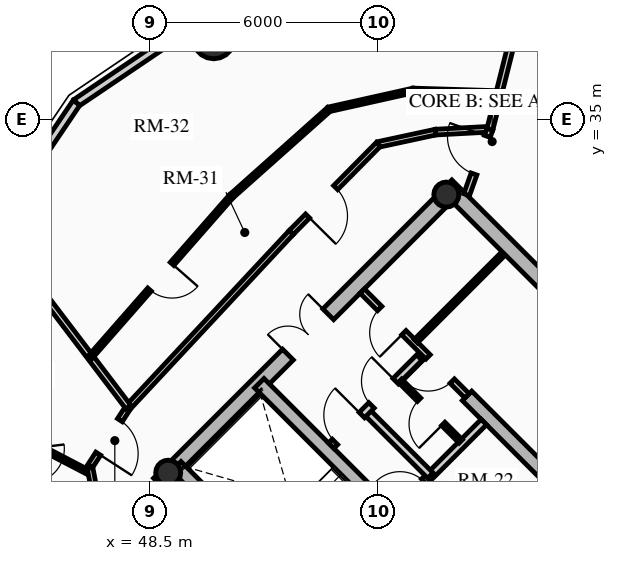
"""IFC4 building model, lengths in metres.
Left out: names, types, materials, properties, quantities, classifications, styles, units other than length and angle.
Written with IfcOpenShell. Run it as: python <this file> out.ifc"""

import sys

from ifc_helpers import new_model, si_unit, direction, frame, frame_2d, origin, origin_2d, place, context, subcontext, project, spatial, rectangle, circle, hollow_circle, extrude, source, transform, mapped, element, fill, save


model = new_model("IFC4")
c1 = context("Model", 3, precision=1e-05, world=origin(), true_north=direction((0.0, 1.0)))
c2 = subcontext(c1, "Body", "Model", "MODEL_VIEW")
j1 = project(units=[si_unit("LENGTHUNIT", "METRE"), si_unit("PLANEANGLEUNIT", "RADIAN")], contexts=[c1])
p1 = place(None, origin())
s1 = spatial("IfcSite", under=j1, at=p1, CompositionType="ELEMENT")
p2 = place(p1, origin())
s2 = spatial("IfcBuilding", under=s1, at=p2, CompositionType="ELEMENT")
p3 = place(p2, frame((0.0, 0.0, 219.94)))
s3 = spatial("IfcBuildingStorey", under=s2, at=p3, CompositionType="ELEMENT", Elevation=219.94)
for number, where, z_axis, x_axis in (
    (1, (58.702, 15.732, 0.0), (0.0, 0.0, 1.0), (-0.707, 0.707, 0.0)),
    (2, (66.268, 23.298, 0.0), (0.0, 0.0, 1.0), (-0.707, 0.707, 0.0)),
):
    element("IfcWall", number, at=place(p3, frame(where, z_axis=z_axis, x_axis=x_axis)), inside=s3, PredefinedType="SHEAR", context=c2, shape_type="SweptSolid", body=[
        extrude(rectangle(XDim=14.1, YDim=0.4, at=frame_2d((7.05, 0.0))), origin(), (0.0, 0.0, 1.0), 2.91),
    ])
p4 = place(p3, frame((48.873, 25.561, 0.0), z_axis=(0.0, 0.0, 1.0), x_axis=(0.707106781187, 0.707106781187, 0.0)))
e3 = element("IfcWall", 3, at=p4, inside=s3, PredefinedType="SHEAR", context=c2, shape_type="SweptSolid", body=[
    extrude(rectangle(XDim=10.7, YDim=0.4, at=frame_2d((5.35, 0.0))), origin(), (0.0, 0.0, 1.0), 2.91),
])
m1 = source(origin(), c2, "Body", "SweptSolid", [
    extrude(rectangle(XDim=1.5, YDim=2.02, at=frame_2d((0.75, 1.01))), frame((0.0, 0.21, 0.0), z_axis=(0.0, -1.0, 0.0), x_axis=(1.0, 0.0, 0.0)), (0.0, 0.0, 1.0), 0.42),
])
p5 = place(p4, frame((4.6, 0.0, 0.0)))
e4 = element("IfcOpeningElement", 4, at=p5, cuts=e3, PredefinedType="OPENING", context=c2, shape_type="MappedRepresentation", body=[
    mapped(m1, transform((0.0, 0.0, 0.0), x_axis=(1.0, 0.0, 0.0), y_axis=(0.0, 1.0, 0.0), z_axis=(0.0, 0.0, 1.0), scale=1.0)),
])
p6 = place(p3, frame((61.06, 18.373, 0.0), z_axis=(0.0, 0.0, 1.0), x_axis=(-0.707106781187, 0.707106781187, 0.0)))
e5 = element("IfcWall", 5, at=p6, inside=s3, PredefinedType="SHEAR", context=c2, shape_type="SweptSolid", body=[
    extrude(rectangle(XDim=13.7, YDim=0.35, at=frame_2d((6.85, 0.0))), origin(), (0.0, 0.0, 1.0), 2.91),
])
m2 = source(origin(), c2, "Body", "SweptSolid", [
    extrude(rectangle(XDim=1.1, YDim=2.015, at=frame_2d((0.55, 1.007))), frame((0.0, 0.185, 0.0), z_axis=(0.0, -1.0, 0.0), x_axis=(1.0, 0.0, 0.0)), (0.0, 0.0, 1.0), 0.37),
])
p7 = place(p6, frame((4.85, 0.0, 0.0)))
e6 = element("IfcOpeningElement", 6, at=p7, cuts=e5, PredefinedType="OPENING", context=c2, shape_type="MappedRepresentation", body=[
    mapped(m2, transform((0.0, 0.0, 0.0), x_axis=(1.0, 0.0, 0.0), y_axis=(0.0, 1.0, 0.0), z_axis=(0.0, 0.0, 1.0), scale=1.0)),
])
p8 = place(p6, frame((0.625, 0.0, 0.0)))
e7 = element("IfcOpeningElement", 7, at=p8, cuts=e5, PredefinedType="OPENING", context=c2, shape_type="MappedRepresentation", body=[
    mapped(m2, transform((0.0, 0.0, 0.0), x_axis=(1.0, 0.0, 0.0), y_axis=(0.0, 1.0, 0.0), z_axis=(0.0, 0.0, 1.0), scale=1.0)),
])
p9 = place(p6, frame((2.625, 0.0, 0.0)))
e8 = element("IfcOpeningElement", 8, at=p9, cuts=e5, PredefinedType="OPENING", context=c2, shape_type="MappedRepresentation", body=[
    mapped(m2, transform((0.0, 0.0, 0.0), x_axis=(1.0, 0.0, 0.0), y_axis=(0.0, 1.0, 0.0), z_axis=(0.0, 0.0, 1.0), scale=1.0)),
])
m3 = source(origin(), c2, "Body", "SweptSolid", [
    extrude(rectangle(XDim=1.15, YDim=2.02, at=frame_2d((0.575, 1.01))), frame((0.0, 0.185, 0.0), z_axis=(0.0, -1.0, 0.0), x_axis=(1.0, 0.0, 0.0)), (0.0, 0.0, 1.0), 0.37),
])
p10 = place(p6, frame((7.27, 0.0, 0.0)))
e9 = element("IfcOpeningElement", 9, at=p10, cuts=e5, PredefinedType="OPENING", context=c2, shape_type="MappedRepresentation", body=[
    mapped(m3, transform((0.0, 0.0, 0.0), x_axis=(1.0, 0.0, 0.0), y_axis=(0.0, 1.0, 0.0), z_axis=(0.0, 0.0, 1.0), scale=1.0)),
])
p11 = place(p3, frame((63.627, 20.94, 0.0), z_axis=(0.0, 0.0, 1.0), x_axis=(-0.707119496762, 0.707094065383, 0.0)))
e10 = element("IfcWall", 10, at=p11, inside=s3, PredefinedType="SHEAR", context=c2, shape_type="SweptSolid", body=[
    extrude(rectangle(XDim=9.6, YDim=0.35, at=frame_2d((4.8, 0.0))), origin(), (0.0, 0.0, 1.0), 2.91),
])
p12 = place(p11, frame((5.28, 0.0, 0.0)))
e11 = element("IfcOpeningElement", 11, at=p12, cuts=e10, PredefinedType="OPENING", context=c2, shape_type="MappedRepresentation", body=[
    mapped(m3, transform((0.0, 0.0, 0.0), x_axis=(1.0, 0.0, 0.0), y_axis=(0.0, 1.0, 0.0), z_axis=(0.0, 0.0, 1.0), scale=1.0)),
])
p13 = place(p3, frame((53.922, 21.141, 0.0), z_axis=(0.0, 0.0, 1.0), x_axis=(-0.707106781187, 0.707106781187, 0.0)))
e12 = element("IfcWall", 12, at=p13, inside=s3, PredefinedType="SHEAR", context=c2, shape_type="SweptSolid", body=[
    extrude(rectangle(XDim=6.695, YDim=0.35, at=frame_2d((3.348, 0.0))), origin(), (0.0, 0.0, 1.0), 2.91),
])
for number, where, z_axis, x_axis in (
    (13, (48.976, 25.706, 0.0), (0.0, 0.0, 1.0), (0.707, 0.707, 0.0)),
    (14, (56.294, 33.024, 0.0), (0.0, 0.0, 1.0), (0.707, 0.707, 0.0)),
):
    element("IfcColumn", number, at=place(p3, frame(where, z_axis=z_axis, x_axis=x_axis)), inside=s3, PredefinedType="COLUMN", context=c2, shape_type="SweptSolid", body=[
        extrude(hollow_circle(Radius=0.33, WallThickness=0.025, at=origin_2d()), origin(), (0.0, 0.0, 1.0), 2.91),
    ])
p14 = place(p3, frame((50.173, 37.146, 0.0), z_axis=(0.0, 0.0, 1.0), x_axis=(1.0, 0.0, 0.0)))
e15 = element("IfcColumn", 15, at=p14, inside=s3, PredefinedType="USERDEFINED", context=c2, shape_type="SweptSolid", body=[
    extrude(circle(Radius=0.55, at=origin_2d()), origin(), (0.0, 0.0, 1.0), 2.91),
])
p15 = place(p3, frame((46.561, 35.439, 0.0), z_axis=(0.0, 0.0, 1.0), x_axis=(0.828833723692, 0.559495003079, 0.0)))
e16 = element("IfcWall", 16, at=p15, inside=s3, PredefinedType="SOLIDWALL", context=c2, shape_type="SweptSolid", body=[
    extrude(rectangle(XDim=3.976, YDim=0.22, at=frame_2d((1.988, 0.0))), origin(), (0.0, 0.0, 1.0), 2.322),
])
p16 = place(p3, frame((44.337, 32.144, 0.0), z_axis=(0.0, 0.0, 1.0), x_axis=(0.559495003079, 0.828833723692, 0.0)))
e17 = element("IfcWall", 17, at=p16, inside=s3, PredefinedType="SOLIDWALL", context=c2, shape_type="SweptSolid", body=[
    extrude(rectangle(XDim=3.976, YDim=0.22, at=frame_2d((1.988, 0.0))), origin(), (0.0, 0.0, 1.0), 2.322),
])
m4 = source(origin(), c2, "Body", "SweptSolid", [
    extrude(rectangle(XDim=1.05, YDim=1.3, at=frame_2d((0.525, 0.65))), frame((0.0, 0.12, 0.0), z_axis=(0.0, -1.0, 0.0), x_axis=(1.0, 0.0, 0.0)), (0.0, 0.0, 1.0), 0.24),
])
p17 = place(p16, frame((1.463, 0.0, 0.65)))
e18 = element("IfcOpeningElement", 18, at=p17, cuts=e17, PredefinedType="OPENING", context=c2, shape_type="MappedRepresentation", body=[
    mapped(m4, transform((0.0, 0.0, 0.0), x_axis=(1.0, 0.0, 0.0), y_axis=(0.0, 1.0, 0.0), z_axis=(0.0, 0.0, 1.0), scale=1.0)),
])
p18 = place(p3, frame((54.961, 24.719, 0.0), z_axis=(0.0, 0.0, 1.0), x_axis=(0.707106781187, 0.707106781187, 0.0)))
e19 = element("IfcWall", 19, at=p18, inside=s3, PredefinedType="PARTITIONING", context=c2, shape_type="SweptSolid", body=[
    extrude(rectangle(XDim=3.28, YDim=0.2, at=frame_2d((1.64, 0.0))), origin(), (0.0, 0.0, 1.0), 2.685),
])
m5 = source(origin(), c2, "Body", "SweptSolid", [
    extrude(rectangle(XDim=0.9, YDim=2.005, at=frame_2d((0.45, 1.002))), frame((0.0, 0.11, 0.0), z_axis=(0.0, -1.0, 0.0), x_axis=(1.0, 0.0, 0.0)), (0.0, 0.0, 1.0), 0.22),
])
p19 = place(p18, frame((0.16, 0.0, 0.0)))
e20 = element("IfcOpeningElement", 20, at=p19, cuts=e19, PredefinedType="OPENING", context=c2, shape_type="MappedRepresentation", body=[
    mapped(m5, transform((0.0, 0.0, 0.0), x_axis=(1.0, 0.0, 0.0), y_axis=(0.0, 1.0, 0.0), z_axis=(0.0, 0.0, 1.0), scale=1.0)),
])
p20 = place(p3, frame((55.874, 25.631, 0.0), z_axis=(0.0, 0.0, 1.0), x_axis=(-0.707157639372, 0.707055919343, 0.0)))
e21 = element("IfcWall", 21, at=p20, inside=s3, PredefinedType="PARTITIONING", context=c2, shape_type="SweptSolid", body=[
    extrude(rectangle(XDim=2.4, YDim=0.2, at=frame_2d((1.2, 0.0))), origin(), (0.0, 0.0, 1.0), 2.685),
])
p21 = place(p3, frame((53.264, 26.416, 0.0), z_axis=(0.0, 0.0, 1.0), x_axis=(0.707106781187, 0.707106781187, 0.0)))
e22 = element("IfcWall", 22, at=p21, inside=s3, PredefinedType="PARTITIONING", context=c2, shape_type="SweptSolid", body=[
    extrude(rectangle(XDim=3.28, YDim=0.2, at=frame_2d((1.64, 0.0))), origin(), (0.0, 0.0, 1.0), 2.685),
])
m6 = source(origin(), c2, "Body", "SweptSolid", [
    extrude(rectangle(XDim=1.0, YDim=2.015, at=frame_2d((0.5, 1.007))), frame((0.0, 0.11, 0.0), z_axis=(0.0, -1.0, 0.0), x_axis=(1.0, 0.0, 0.0)), (0.0, 0.0, 1.0), 0.22),
])
p22 = place(p21, frame((0.14, 0.0, 0.0)))
e23 = element("IfcOpeningElement", 23, at=p22, cuts=e22, PredefinedType="OPENING", context=c2, shape_type="MappedRepresentation", body=[
    mapped(m6, transform((0.0, 0.0, 0.0), x_axis=(1.0, 0.0, 0.0), y_axis=(0.0, 1.0, 0.0), z_axis=(0.0, 0.0, 1.0), scale=1.0)),
])
p23 = place(p21, frame((1.5, 0.0, 0.0)))
e24 = element("IfcOpeningElement", 24, at=p23, cuts=e22, PredefinedType="OPENING", context=c2, shape_type="MappedRepresentation", body=[
    mapped(m5, transform((0.0, 0.0, 0.0), x_axis=(1.0, 0.0, 0.0), y_axis=(0.0, 1.0, 0.0), z_axis=(0.0, 0.0, 1.0), scale=1.0)),
])
p24 = place(p3, frame((56.673, 26.529, 0.0), z_axis=(0.0, 0.0, 1.0), x_axis=(-0.707052764397, 0.70716079385, 0.0)))
e25 = element("IfcWall", 25, at=p24, inside=s3, PredefinedType="PARTITIONING", context=c2, shape_type="SweptSolid", body=[
    extrude(rectangle(XDim=2.26, YDim=0.125, at=frame_2d((1.13, 0.0))), origin(), (0.0, 0.0, 1.0), 2.685),
])
m7 = source(origin(), c2, "Body", "SweptSolid", [
    extrude(rectangle(XDim=0.9, YDim=2.005, at=frame_2d((0.45, 1.002))), frame((0.0, 0.073, 0.0), z_axis=(0.0, -1.0, 0.0), x_axis=(1.0, 0.0, 0.0)), (0.0, 0.0, 1.0), 0.145),
])
p25 = place(p24, frame((0.65, 0.0, 0.0)))
e26 = element("IfcOpeningElement", 26, at=p25, cuts=e25, PredefinedType="OPENING", context=c2, shape_type="MappedRepresentation", body=[
    mapped(m7, transform((0.0, 0.0, 0.0), x_axis=(1.0, 0.0, 0.0), y_axis=(0.0, 1.0, 0.0), z_axis=(0.0, 0.0, 1.0), scale=1.0)),
])
p26 = place(p3, frame((56.839, 27.728, 0.0), z_axis=(0.0, 0.0, 1.0), x_axis=(-0.707106781187, 0.707106781187, 0.0)))
e27 = element("IfcWall", 27, at=p26, inside=s3, PredefinedType="PARTITIONING", context=c2, shape_type="SweptSolid", body=[
    extrude(rectangle(XDim=3.9, YDim=0.16, at=frame_2d((1.95, 0.0))), origin(), (0.0, 0.0, 1.0), 2.685),
])
m8 = source(origin(), c2, "Body", "SweptSolid", [
    extrude(rectangle(XDim=0.9, YDim=2.005, at=frame_2d((0.45, 1.002))), frame((0.0, 0.09, 0.0), z_axis=(0.0, -1.0, 0.0), x_axis=(1.0, 0.0, 0.0)), (0.0, 0.0, 1.0), 0.18),
])
p27 = place(p26, frame((0.55, 0.0, 0.0)))
e28 = element("IfcOpeningElement", 28, at=p27, cuts=e27, PredefinedType="OPENING", context=c2, shape_type="MappedRepresentation", body=[
    mapped(m8, transform((0.0, 0.0, 0.0), x_axis=(1.0, 0.0, 0.0), y_axis=(0.0, 1.0, 0.0), z_axis=(0.0, 0.0, 1.0), scale=1.0)),
])
p28 = place(p26, frame((2.35, 0.0, 0.0)))
e29 = element("IfcOpeningElement", 29, at=p28, cuts=e27, PredefinedType="OPENING", context=c2, shape_type="MappedRepresentation", body=[
    mapped(m8, transform((0.0, 0.0, 0.0), x_axis=(1.0, 0.0, 0.0), y_axis=(0.0, 1.0, 0.0), z_axis=(0.0, 0.0, 1.0), scale=1.0)),
])
p29 = place(p3, frame((55.492, 29.167, 0.0), z_axis=(0.0, 0.0, 1.0), x_axis=(0.707144688645, 0.707068871696, 0.0)))
e30 = element("IfcWall", 30, at=p29, inside=s3, PredefinedType="PARTITIONING", context=c2, shape_type="SweptSolid", body=[
    extrude(rectangle(XDim=3.22, YDim=0.125, at=frame_2d((1.61, 0.0))), origin(), (0.0, 0.0, 1.0), 2.222),
])
p30 = place(p3, frame((57.44, 34.744, 0.0), z_axis=(0.0, 0.0, 1.0), x_axis=(-0.998578025565, -0.053309725738, 0.0)))
e31 = element("IfcWall", 31, at=p30, inside=s3, PredefinedType="PARTITIONING", context=c2, shape_type="SweptSolid", body=[
    extrude(rectangle(XDim=1.433, YDim=0.15, at=frame_2d((0.717, 0.0))), origin(), (0.0, 0.0, 1.0), 2.322),
])
p31 = place(p3, frame((56.009, 34.667, 0.0), z_axis=(0.0, 0.0, 1.0), x_axis=(-0.977625498152, -0.210353001795, 0.0)))
e32 = element("IfcWall", 32, at=p31, inside=s3, PredefinedType="PARTITIONING", context=c2, shape_type="SweptSolid", body=[
    extrude(rectangle(XDim=1.538, YDim=0.15, at=frame_2d((0.769, 0.0))), origin(), (0.0, 0.0, 1.0), 2.255),
])
p32 = place(p3, frame((54.506, 34.344, 0.0), z_axis=(0.0, 0.0, 1.0), x_axis=(-0.703053402247, -0.711137056824, 0.0)))
e33 = element("IfcWall", 33, at=p32, inside=s3, PredefinedType="PARTITIONING", context=c2, shape_type="SweptSolid", body=[
    extrude(rectangle(XDim=3.262, YDim=0.15, at=frame_2d((1.631, 0.0))), origin(), (0.0, 0.0, 1.0), 2.322),
])
m9 = source(origin(), c2, "Body", "SweptSolid", [
    extrude(rectangle(XDim=1.05, YDim=2.015, at=frame_2d((0.525, 1.007))), frame((0.0, 0.085, 0.0), z_axis=(0.0, -1.0, 0.0), x_axis=(1.0, 0.0, 0.0)), (0.0, 0.0, 1.0), 0.17),
])
p33 = place(p32, frame((1.599, 0.0, 0.0)))
e34 = element("IfcOpeningElement", 34, at=p33, cuts=e33, PredefinedType="OPENING", context=c2, shape_type="MappedRepresentation", body=[
    mapped(m9, transform((0.0, 0.0, 0.0), x_axis=(1.0, 0.0, 0.0), y_axis=(0.0, 1.0, 0.0), z_axis=(0.0, 0.0, 1.0), scale=1.0)),
])
p34 = place(p3, frame((52.212, 32.024, 0.0), z_axis=(0.0, 0.0, 1.0), x_axis=(-0.682158998173, -0.731203871169, 0.0)))
e35 = element("IfcWall", 35, at=p34, inside=s3, PredefinedType="PARTITIONING", context=c2, shape_type="SweptSolid", body=[
    extrude(rectangle(XDim=6.282, YDim=0.15, at=frame_2d((3.141, 0.0))), origin(), (0.0, 0.0, 1.0), 2.255),
])
p35 = place(p3, frame((47.927, 27.431, 0.0), z_axis=(0.0, 0.0, 1.0), x_axis=(-0.543126643356, -0.839650790077, 0.0)))
e36 = element("IfcWall", 36, at=p35, inside=s3, PredefinedType="PARTITIONING", context=c2, shape_type="SweptSolid", body=[
    extrude(rectangle(XDim=1.868, YDim=0.15, at=frame_2d((0.934, 0.0))), origin(), (0.0, 0.0, 1.0), 2.255),
])
p36 = place(p35, frame((0.409, 0.0, 0.0)))
e37 = element("IfcOpeningElement", 37, at=p36, cuts=e36, PredefinedType="OPENING", context=c2, shape_type="MappedRepresentation", body=[
    mapped(m9, transform((0.0, 0.0, 0.0), x_axis=(1.0, 0.0, 0.0), y_axis=(0.0, 1.0, 0.0), z_axis=(0.0, 0.0, 1.0), scale=1.0)),
])
p37 = place(p3, frame((46.912, 25.862, 0.0), z_axis=(0.0, 0.0, 1.0), x_axis=(0.186095172215, -0.98253172309, 0.0)))
e38 = element("IfcWall", 38, at=p37, inside=s3, PredefinedType="PARTITIONING", context=c2, shape_type="SweptSolid", body=[
    extrude(rectangle(XDim=1.346, YDim=0.15, at=frame_2d((0.673, 0.0))), origin(), (0.0, 0.0, 1.0), 2.322),
])
p38 = place(p3, frame((57.44, 34.744, 0.0), z_axis=(0.0, 0.0, 1.0), x_axis=(0.243619816457, 0.969870808422, 0.0)))
e39 = element("IfcWall", 39, at=p38, inside=s3, PredefinedType="PARTITIONING", context=c2, shape_type="SweptSolid", body=[
    extrude(rectangle(XDim=3.496, YDim=0.16, at=frame_2d((1.748, 0.0))), origin(), (0.0, 0.0, 1.0), 2.322),
])
p39 = place(p3, frame((47.927, 27.431, 0.0), z_axis=(0.0, 0.0, 1.0), x_axis=(-0.604823333103, 0.796359677366, 0.0)))
e40 = element("IfcWall", 40, at=p39, inside=s3, PredefinedType="PARTITIONING", context=c2, shape_type="SweptSolid", body=[
    extrude(rectangle(XDim=5.907, YDim=0.16, at=frame_2d((2.953, 0.0))), origin(), (0.0, 0.0, 1.0), 2.322),
])
p40 = place(p3, frame((56.828, 33.021, 0.0), z_axis=(0.0, 0.0, 1.0), x_axis=(0.334788446034, 0.942293317605, 0.0)))
e41 = element("IfcWall", 41, at=p40, inside=s3, PredefinedType="PARTITIONING", context=c2, shape_type="SweptSolid", body=[
    extrude(rectangle(XDim=1.829, YDim=0.16, at=frame_2d((0.915, 0.0))), origin(), (0.0, 0.0, 1.0), 2.255),
])
m10 = source(origin(), c2, "Body", "SweptSolid", [
    extrude(rectangle(XDim=1.05, YDim=2.015, at=frame_2d((0.525, 1.007))), frame((0.0, 0.09, 0.0), z_axis=(0.0, -1.0, 0.0), x_axis=(1.0, 0.0, 0.0)), (0.0, 0.0, 1.0), 0.18),
])
p41 = place(p40, frame((0.579, 0.0, 0.0)))
e42 = element("IfcOpeningElement", 42, at=p41, cuts=e41, PredefinedType="OPENING", context=c2, shape_type="MappedRepresentation", body=[
    mapped(m10, transform((0.0, 0.0, 0.0), x_axis=(1.0, 0.0, 0.0), y_axis=(0.0, 1.0, 0.0), z_axis=(0.0, 0.0, 1.0), scale=1.0)),
])
p42 = place(p3, frame((57.679, 35.693, 0.0), z_axis=(0.0, 0.0, 1.0), x_axis=(-0.999526298938, 0.030776252722, 0.0)))
e43 = element("IfcWall", 43, at=p42, inside=s3, PredefinedType="PARTITIONING", context=c2, shape_type="SweptSolid", body=[
    extrude(rectangle(XDim=2.261, YDim=0.125, at=frame_2d((1.13, 0.0))), origin(), (0.0, 0.0, 1.0), 2.322),
])
p43 = place(p3, frame((55.419, 35.763, 0.0), z_axis=(0.0, 0.0, 1.0), x_axis=(-0.975917771425, -0.218138725166, 0.0)))
e44 = element("IfcWall", 44, at=p43, inside=s3, PredefinedType="PARTITIONING", context=c2, shape_type="SweptSolid", body=[
    extrude(rectangle(XDim=2.268, YDim=0.125, at=frame_2d((1.134, 0.0))), origin(), (0.0, 0.0, 1.0), 2.255),
])
p44 = place(p3, frame((53.206, 35.268, 0.0), z_axis=(0.0, 0.0, 1.0), x_axis=(-0.746677760999, -0.665185929819, 0.0)))
e45 = element("IfcWall", 45, at=p44, inside=s3, PredefinedType="PARTITIONING", context=c2, shape_type="SweptSolid", body=[
    extrude(rectangle(XDim=3.445, YDim=0.125, at=frame_2d((1.723, 0.0))), origin(), (0.0, 0.0, 1.0), 2.322),
])
p45 = place(p3, frame((50.634, 32.977, 0.0), z_axis=(0.0, 0.0, 1.0), x_axis=(-0.659241945747, -0.751930885765, 0.0)))
e46 = element("IfcWall", 46, at=p45, inside=s3, PredefinedType="PARTITIONING", context=c2, shape_type="SweptSolid", body=[
    extrude(rectangle(XDim=5.624, YDim=0.125, at=frame_2d((2.812, 0.0))), origin(), (0.0, 0.0, 1.0), 2.255),
])
p46 = place(p45, frame((2.362, 0.0, 0.0)))
e47 = element("IfcOpeningElement", 47, at=p46, cuts=e46, PredefinedType="OPENING", context=c2, shape_type="MappedRepresentation", body=[
    mapped(m7, transform((0.0, 0.0, 0.0), x_axis=(1.0, 0.0, 0.0), y_axis=(0.0, 1.0, 0.0), z_axis=(0.0, 0.0, 1.0), scale=1.0)),
])
p47 = place(p3, frame((46.844, 25.731, 0.0), z_axis=(0.0, 0.0, 1.0), x_axis=(-0.886802533251, 0.462148533504, 0.0)))
e48 = element("IfcWall", 48, at=p47, inside=s3, PredefinedType="PARTITIONING", context=c2, shape_type="SweptSolid", body=[
    extrude(rectangle(XDim=1.719, YDim=0.125, at=frame_2d((0.859, 0.0))), origin(), (0.0, 0.0, 1.0), 2.685),
])
m11 = source(origin(), c2, "Body", "SweptSolid", [
    extrude(rectangle(XDim=1.5, YDim=2.02, at=frame_2d((0.75, 1.01))), frame((0.0, 0.025, 0.0), z_axis=(0.0, -1.0, 0.0), x_axis=(1.0, 0.0, 0.0)), (0.0, 0.0, 1.0), 0.05),
])
p48 = place(p5, origin())
e49 = element("IfcDoor", 49, at=p48, inside=s3, OperationType="DOUBLE_DOOR_SINGLE_SWING", PredefinedType="DOOR", context=c2, shape_type="MappedRepresentation", body=[
    mapped(m11, transform((0.0, 0.0, 0.0), x_axis=(1.0, 0.0, 0.0), y_axis=(0.0, 1.0, 0.0), z_axis=(0.0, 0.0, 1.0), scale=1.0)),
])
fill(e4, e49)
m12 = source(origin(), c2, "Body", "SweptSolid", [
    extrude(rectangle(XDim=0.9, YDim=2.005, at=frame_2d((0.45, 1.002))), frame((0.0, 0.025, 0.0), z_axis=(0.0, -1.0, 0.0), x_axis=(1.0, 0.0, 0.0)), (0.0, 0.0, 1.0), 0.05),
])
p49 = place(p19, origin())
e50 = element("IfcDoor", 50, at=p49, inside=s3, OperationType="SINGLE_SWING_LEFT", PredefinedType="DOOR", context=c2, shape_type="MappedRepresentation", body=[
    mapped(m12, transform((0.0, 0.0, 0.0), x_axis=(1.0, 0.0, 0.0), y_axis=(0.0, 1.0, 0.0), z_axis=(0.0, 0.0, 1.0), scale=1.0)),
])
fill(e20, e50)
m13 = source(origin(), c2, "Body", "SweptSolid", [
    extrude(rectangle(XDim=1.0, YDim=2.015, at=frame_2d((0.5, 1.007))), frame((0.0, 0.025, 0.0), z_axis=(0.0, -1.0, 0.0), x_axis=(1.0, 0.0, 0.0)), (0.0, 0.0, 1.0), 0.05),
])
p50 = place(p22, origin())
e51 = element("IfcDoor", 51, at=p50, inside=s3, OperationType="SINGLE_SWING_RIGHT", PredefinedType="DOOR", context=c2, shape_type="MappedRepresentation", body=[
    mapped(m13, transform((0.0, 0.0, 0.0), x_axis=(1.0, 0.0, 0.0), y_axis=(0.0, 1.0, 0.0), z_axis=(0.0, 0.0, 1.0), scale=1.0)),
])
fill(e23, e51)
p51 = place(p23, origin())
e52 = element("IfcDoor", 52, at=p51, inside=s3, OperationType="SINGLE_SWING_RIGHT", PredefinedType="DOOR", context=c2, shape_type="MappedRepresentation", body=[
    mapped(m12, transform((0.0, 0.0, 0.0), x_axis=(1.0, 0.0, 0.0), y_axis=(0.0, 1.0, 0.0), z_axis=(0.0, 0.0, 1.0), scale=1.0)),
])
fill(e24, e52)
p52 = place(p25, origin())
e53 = element("IfcDoor", 53, at=p52, inside=s3, OperationType="SINGLE_SWING_LEFT", PredefinedType="DOOR", context=c2, shape_type="MappedRepresentation", body=[
    mapped(m12, transform((0.0, 0.0, 0.0), x_axis=(1.0, 0.0, 0.0), y_axis=(0.0, 1.0, 0.0), z_axis=(0.0, 0.0, 1.0), scale=1.0)),
])
fill(e26, e53)
p53 = place(p27, origin())
e54 = element("IfcDoor", 54, at=p53, inside=s3, OperationType="SINGLE_SWING_RIGHT", PredefinedType="DOOR", context=c2, shape_type="MappedRepresentation", body=[
    mapped(m12, transform((0.0, 0.0, 0.0), x_axis=(1.0, 0.0, 0.0), y_axis=(0.0, 1.0, 0.0), z_axis=(0.0, 0.0, 1.0), scale=1.0)),
])
fill(e28, e54)
p54 = place(p28, origin())
e55 = element("IfcDoor", 55, at=p54, inside=s3, OperationType="SINGLE_SWING_LEFT", PredefinedType="DOOR", context=c2, shape_type="MappedRepresentation", body=[
    mapped(m12, transform((0.0, 0.0, 0.0), x_axis=(1.0, 0.0, 0.0), y_axis=(0.0, 1.0, 0.0), z_axis=(0.0, 0.0, 1.0), scale=1.0)),
])
fill(e29, e55)
m14 = source(origin(), c2, "Body", "SweptSolid", [
    extrude(rectangle(XDim=1.05, YDim=2.015, at=frame_2d((0.525, 1.007))), frame((0.0, 0.025, 0.0), z_axis=(0.0, -1.0, 0.0), x_axis=(1.0, 0.0, 0.0)), (0.0, 0.0, 1.0), 0.05),
])
p55 = place(p41, origin())
e56 = element("IfcDoor", 56, at=p55, inside=s3, OperationType="SINGLE_SWING_RIGHT", PredefinedType="DOOR", context=c2, shape_type="MappedRepresentation", body=[
    mapped(m14, transform((0.0, 0.0, 0.0), x_axis=(1.0, 0.0, 0.0), y_axis=(0.0, 1.0, 0.0), z_axis=(0.0, 0.0, 1.0), scale=1.0)),
])
fill(e42, e56)
p56 = place(p33, origin())
e57 = element("IfcDoor", 57, at=p56, inside=s3, OperationType="SINGLE_SWING_RIGHT", PredefinedType="DOOR", context=c2, shape_type="MappedRepresentation", body=[
    mapped(m14, transform((0.0, 0.0, 0.0), x_axis=(1.0, 0.0, 0.0), y_axis=(0.0, 1.0, 0.0), z_axis=(0.0, 0.0, 1.0), scale=1.0)),
])
fill(e34, e57)
p57 = place(p46, origin())
e58 = element("IfcDoor", 58, at=p57, inside=s3, OperationType="SINGLE_SWING_LEFT", PredefinedType="DOOR", context=c2, shape_type="MappedRepresentation", body=[
    mapped(m12, transform((0.0, 0.0, 0.0), x_axis=(1.0, 0.0, 0.0), y_axis=(0.0, 1.0, 0.0), z_axis=(0.0, 0.0, 1.0), scale=1.0)),
])
fill(e47, e58)
p58 = place(p36, origin())
e59 = element("IfcDoor", 59, at=p58, inside=s3, OperationType="SINGLE_SWING_RIGHT", PredefinedType="DOOR", context=c2, shape_type="MappedRepresentation", body=[
    mapped(m14, transform((0.0, 0.0, 0.0), x_axis=(1.0, 0.0, 0.0), y_axis=(0.0, 1.0, 0.0), z_axis=(0.0, 0.0, 1.0), scale=1.0)),
])
fill(e37, e59)
save(model, sys.argv[1])
